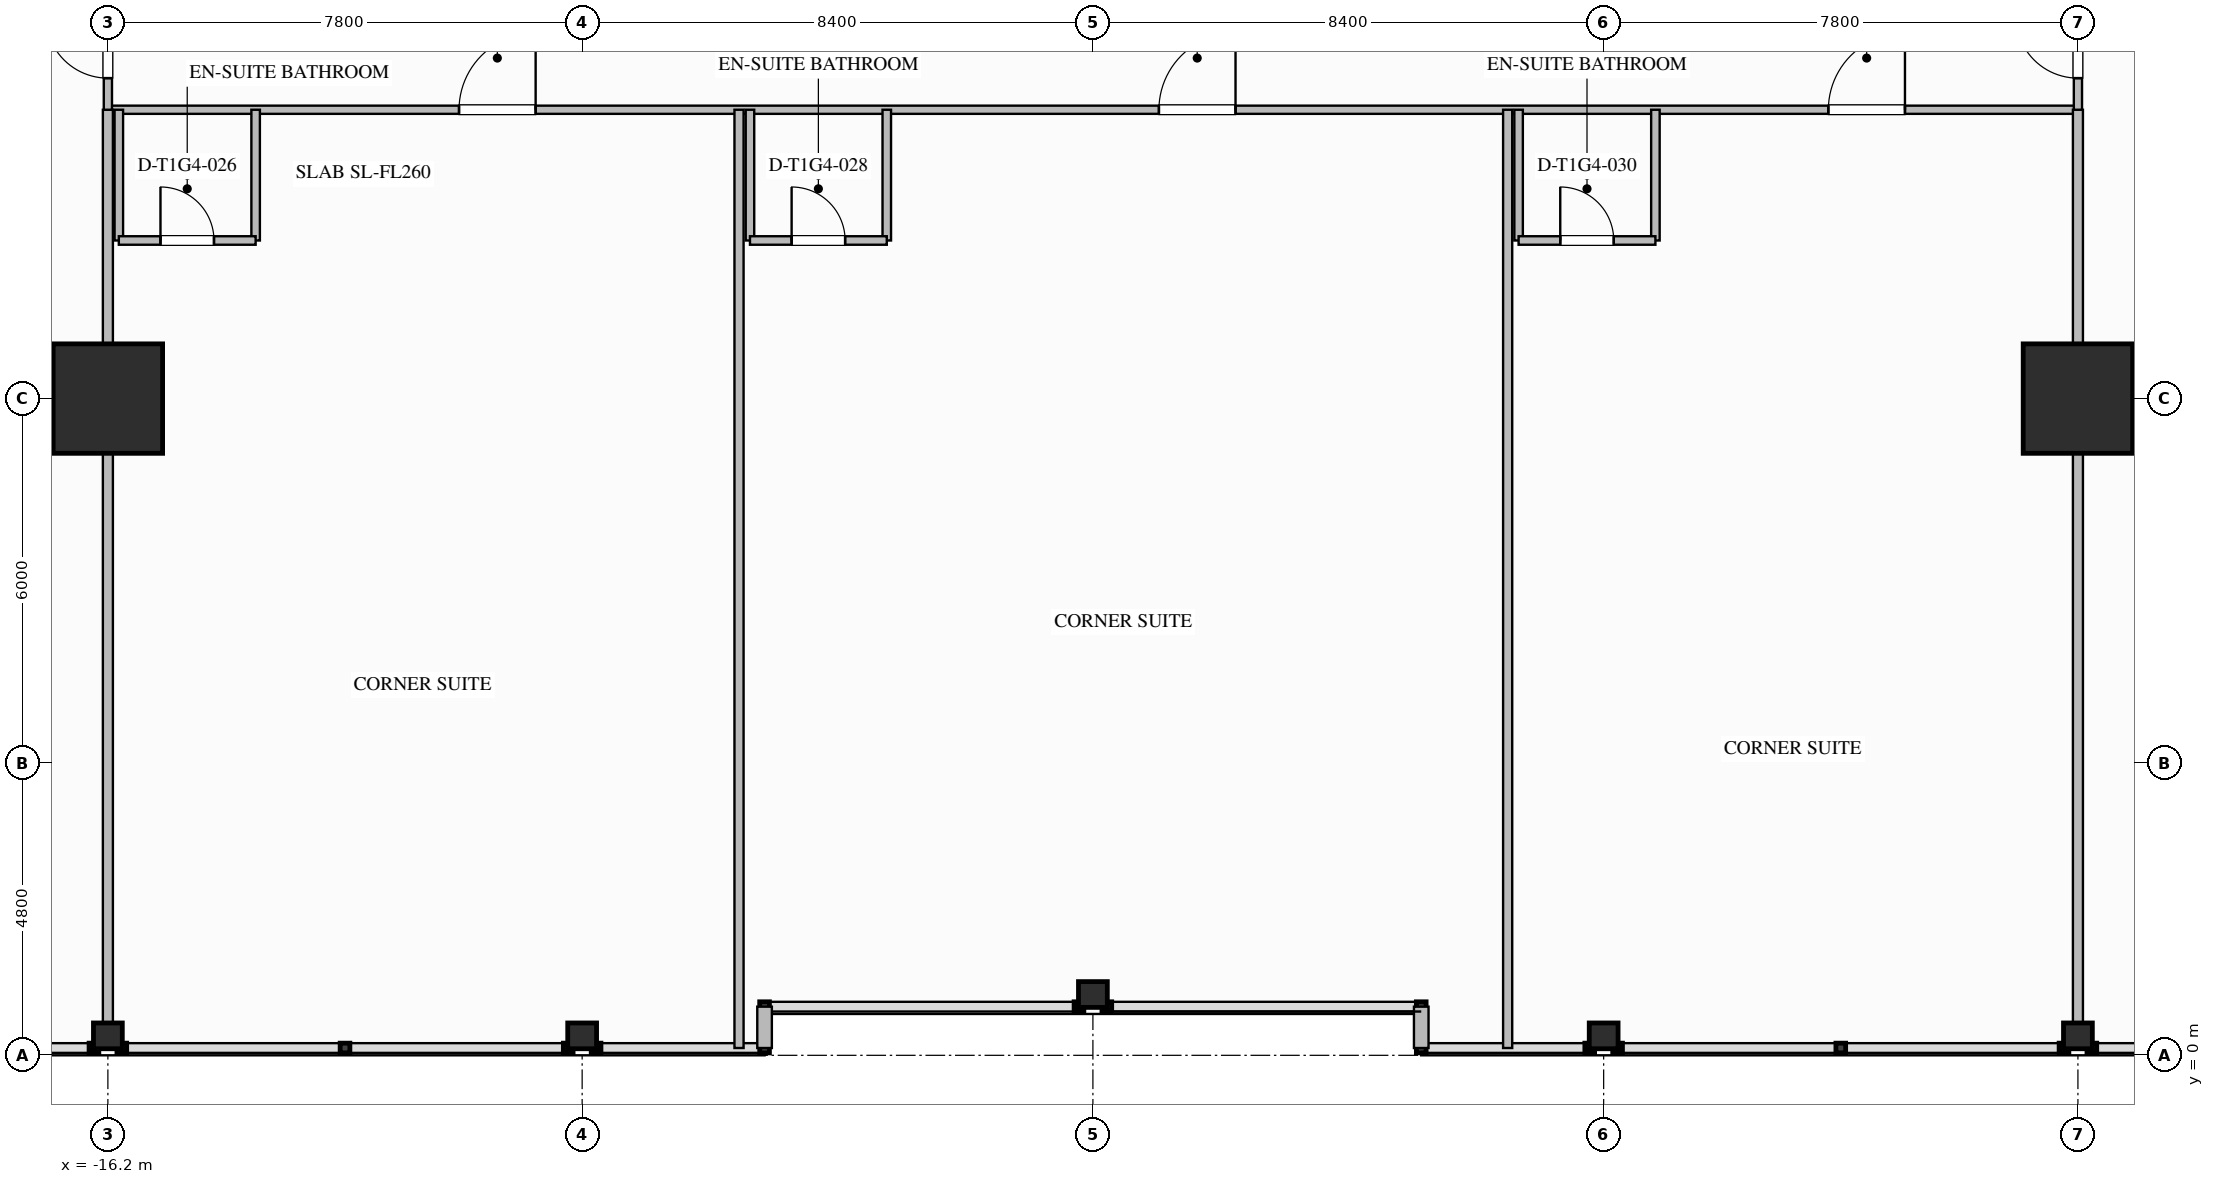
"""IFC4 building model, lengths in metres.
Left out: names, types, materials, properties, quantities, classifications, styles, units other than length and angle.
Written with IfcOpenShell. Run it as: python <this file> out.ifc"""

import sys

from ifc_helpers import new_model, si_unit, direction, frame, frame_2d, origin, origin_2d, place, context, subcontext, project, spatial, rectangle, i_section, extrude, element, fill, save


model = new_model("IFC4")
c1 = context("Model", 3, precision=1e-05, world=origin(), true_north=direction((0.0, 1.0)))
c2 = subcontext(c1, "Body", "Model", "MODEL_VIEW")
j1 = project(units=[si_unit("LENGTHUNIT", "METRE"), si_unit("PLANEANGLEUNIT", "RADIAN")], contexts=[c1])
p1 = place(None, origin())
s1 = spatial("IfcSite", under=j1, at=p1, CompositionType="ELEMENT")
p2 = place(p1, origin())
s2 = spatial("IfcBuilding", under=s1, at=p2, CompositionType="ELEMENT")
p3 = place(p2, frame((0.0, 0.0, 64.7)))
s3 = spatial("IfcBuildingStorey", under=s2, at=p3, CompositionType="ELEMENT", Elevation=64.7)
for number, where, z_axis, x_axis in (
    (1, (-16.2, 10.8, 0.0), (0.0, 0.0, 1.0), (1.0, 0.0, 0.0)),
    (2, (16.2, 10.8, 0.0), (0.0, 0.0, 1.0), (1.0, 0.0, 0.0)),
):
    element("IfcColumn", number, at=place(p3, frame(where, z_axis=z_axis, x_axis=x_axis)), inside=s3, PredefinedType="COLUMN", context=c2, shape_type="SweptSolid", body=[
        extrude(rectangle(XDim=1.8, YDim=1.8, at=origin_2d()), origin(), (0.0, 0.0, 1.0), 3.5),
    ])
for number, where, z_axis, x_axis in (
    (3, (-16.2, 0.32, 0.0), (0.0, 0.0, 1.0), (0.0, 1.0, 0.0)),
    (4, (-8.4, 0.32, 0.0), (0.0, 0.0, 1.0), (0.0, 1.0, 0.0)),
    (5, (0.0, 1.0, 0.0), (0.0, 0.0, 1.0), (0.0, 1.0, 0.0)),
    (6, (8.4, 0.32, 0.0), (0.0, 0.0, 1.0), (0.0, 1.0, 0.0)),
    (7, (16.2, 0.32, 0.0), (0.0, 0.0, 1.0), (0.0, 1.0, 0.0)),
):
    element("IfcColumn", number, at=place(p3, frame(where, z_axis=z_axis, x_axis=x_axis)), inside=s3, PredefinedType="COLUMN", context=c2, shape_type="SweptSolid", body=[
        extrude(i_section(OverallWidth=0.424, OverallDepth=0.474, WebThickness=0.048, FlangeThickness=0.077, FilletRadius=0.03, at=origin_2d()), origin(), (0.0, 0.0, 1.0), 3.497),
    ])
for number, where, z_axis, x_axis in (
    (8, (5.4, 0.12, 0.0), (0.0, 0.0, 1.0), (0.0, 1.0, 0.0)),
    (9, (-5.4, 0.8, 0.0), (0.0, 0.0, 1.0), (0.0, -1.0, 0.0)),
):
    element("IfcWall", number, at=place(p3, frame(where, z_axis=z_axis, x_axis=x_axis)), inside=s3, PredefinedType="STANDARD", context=c2, shape_type="SweptSolid", body=[
        extrude(rectangle(XDim=0.68, YDim=0.24, at=frame_2d((0.34, 0.0))), origin(), (0.0, 0.0, 1.0), 3.24),
    ])
p4 = place(p3, frame((-16.2, 15.55, 0.0), z_axis=(0.0, 0.0, 1.0), x_axis=(1.0, 0.0, 0.0)))
e10 = element("IfcWall", 10, at=p4, inside=s3, PredefinedType="PARTITIONING", context=c2, shape_type="SweptSolid", body=[
    extrude(rectangle(XDim=32.4, YDim=0.135, at=frame_2d((16.2, 0.0))), origin(), (0.0, 0.0, 1.0), 3.24),
])
p5 = place(p4, frame((5.775, 0.0, 0.0)))
e11 = element("IfcOpeningElement", 11, at=p5, cuts=e10, PredefinedType="OPENING", context=c2, shape_type="SweptSolid", body=[
    extrude(rectangle(XDim=1.26, YDim=2.2, at=frame_2d((0.63, 1.1))), frame((0.0, 0.077, 0.0), z_axis=(0.0, -1.0, 0.0), x_axis=(1.0, 0.0, 0.0)), (0.0, 0.0, 1.0), 0.155),
])
p6 = place(p4, frame((17.286, 0.0, 0.0)))
e12 = element("IfcOpeningElement", 12, at=p6, cuts=e10, PredefinedType="OPENING", context=c2, shape_type="SweptSolid", body=[
    extrude(rectangle(XDim=1.26, YDim=2.2, at=frame_2d((0.63, 1.1))), frame((0.0, 0.077, 0.0), z_axis=(0.0, -1.0, 0.0), x_axis=(1.0, 0.0, 0.0)), (0.0, 0.0, 1.0), 0.155),
])
p7 = place(p4, frame((28.295, 0.0, 0.0)))
e13 = element("IfcOpeningElement", 13, at=p7, cuts=e10, PredefinedType="OPENING", context=c2, shape_type="SweptSolid", body=[
    extrude(rectangle(XDim=1.26, YDim=2.2, at=frame_2d((0.63, 1.1))), frame((0.0, 0.077, 0.0), z_axis=(0.0, -1.0, 0.0), x_axis=(1.0, 0.0, 0.0)), (0.0, 0.0, 1.0), 0.155),
])
for number, where, z_axis, x_axis in (
    (14, (-16.2, 0.12, 0.0), (0.0, 0.0, 1.0), (0.0, 1.0, 0.0)),
    (15, (16.2, 0.12, 0.0), (0.0, 0.0, 1.0), (0.0, 1.0, 0.0)),
):
    element("IfcWall", number, at=place(p3, frame(where, z_axis=z_axis, x_axis=x_axis)), inside=s3, PredefinedType="PARTITIONING", context=c2, shape_type="SweptSolid", body=[
        extrude(rectangle(XDim=15.43, YDim=0.165, at=frame_2d((7.715, 0.0))), origin(), (0.0, 0.0, 1.0), 2.452),
    ])
p8 = place(p3, frame((-16.2, 15.55, 0.0), z_axis=(0.0, 0.0, 1.0), x_axis=(0.0, 1.0, 0.0)))
e16 = element("IfcWall", 16, at=p8, inside=s3, PredefinedType="PARTITIONING", context=c2, shape_type="SweptSolid", body=[
    extrude(rectangle(XDim=2.75, YDim=0.135, at=frame_2d((1.375, 0.0))), origin(), (0.0, 0.0, 1.0), 2.452),
])
p9 = place(p8, frame((0.52, 0.0, 0.0)))
e17 = element("IfcOpeningElement", 17, at=p9, cuts=e16, PredefinedType="OPENING", context=c2, shape_type="SweptSolid", body=[
    extrude(rectangle(XDim=1.02, YDim=2.15, at=frame_2d((0.51, 1.075))), frame((0.0, 0.077, 0.0), z_axis=(0.0, -1.0, 0.0), x_axis=(1.0, 0.0, 0.0)), (0.0, 0.0, 1.0), 0.155),
])
p10 = place(p3, frame((16.2, 15.55, 0.0), z_axis=(0.0, 0.0, 1.0), x_axis=(0.0, 1.0, 0.0)))
e18 = element("IfcWall", 18, at=p10, inside=s3, PredefinedType="PARTITIONING", context=c2, shape_type="SweptSolid", body=[
    extrude(rectangle(XDim=2.75, YDim=0.135, at=frame_2d((1.375, 0.0))), origin(), (0.0, 0.0, 1.0), 2.452),
])
p11 = place(p10, frame((0.52, 0.0, 0.0)))
e19 = element("IfcOpeningElement", 19, at=p11, cuts=e18, PredefinedType="OPENING", context=c2, shape_type="SweptSolid", body=[
    extrude(rectangle(XDim=1.02, YDim=2.15, at=frame_2d((0.51, 1.075))), frame((0.0, 0.077, 0.0), z_axis=(0.0, -1.0, 0.0), x_axis=(1.0, 0.0, 0.0)), (0.0, 0.0, 1.0), 0.155),
])
p12 = place(p3, frame((-16.02, 15.55, 0.0), z_axis=(0.0, 0.0, 1.0), x_axis=(0.0, -1.0, 0.0)))
e20 = element("IfcWall", 20, at=p12, inside=s3, PredefinedType="PLUMBINGWALL", context=c2, shape_type="SweptSolid", body=[
    extrude(rectangle(XDim=2.15, YDim=0.14, at=frame_2d((1.075, 0.0))), origin(), (0.0, 0.0, 1.0), 2.452),
])
p13 = place(p3, frame((-13.77, 15.55, 0.0), z_axis=(0.0, 0.0, 1.0), x_axis=(0.0, -1.0, 0.0)))
e21 = element("IfcWall", 21, at=p13, inside=s3, PredefinedType="PLUMBINGWALL", context=c2, shape_type="SweptSolid", body=[
    extrude(rectangle(XDim=2.15, YDim=0.14, at=frame_2d((1.075, 0.0))), origin(), (0.0, 0.0, 1.0), 3.24),
])
p14 = place(p3, frame((-16.02, 13.4, 0.0), z_axis=(0.0, 0.0, 1.0), x_axis=(1.0, 0.0, 0.0)))
e22 = element("IfcWall", 22, at=p14, inside=s3, PredefinedType="PLUMBINGWALL", context=c2, shape_type="SweptSolid", body=[
    extrude(rectangle(XDim=2.25, YDim=0.14, at=frame_2d((1.125, 0.0))), origin(), (0.0, 0.0, 1.0), 3.24),
])
p15 = place(p14, frame((0.685, 0.0, 0.0)))
e23 = element("IfcOpeningElement", 23, at=p15, cuts=e22, PredefinedType="OPENING", context=c2, shape_type="SweptSolid", body=[
    extrude(rectangle(XDim=0.88, YDim=2.1, at=frame_2d((0.44, 1.05))), frame((0.0, 0.08, 0.0), z_axis=(0.0, -1.0, 0.0), x_axis=(1.0, 0.0, 0.0)), (0.0, 0.0, 1.0), 0.16),
])
p16 = place(p3, frame((-5.82, 0.12, 0.0), z_axis=(0.0, 0.0, 1.0), x_axis=(0.0, 1.0, 0.0)))
e24 = element("IfcWall", 24, at=p16, inside=s3, PredefinedType="PARTITIONING", context=c2, shape_type="SweptSolid", body=[
    extrude(rectangle(XDim=15.43, YDim=0.15, at=frame_2d((7.715, 0.0))), origin(), (0.0, 0.0, 1.0), 3.24),
])
for number, where, z_axis, x_axis in (
    (25, (-5.64, 15.55, 0.0), (0.0, 0.0, 1.0), (0.0, -1.0, 0.0)),
    (26, (-3.39, 15.55, 0.0), (0.0, 0.0, 1.0), (0.0, -1.0, 0.0)),
):
    element("IfcWall", number, at=place(p3, frame(where, z_axis=z_axis, x_axis=x_axis)), inside=s3, PredefinedType="PLUMBINGWALL", context=c2, shape_type="SweptSolid", body=[
        extrude(rectangle(XDim=2.15, YDim=0.14, at=frame_2d((1.075, 0.0))), origin(), (0.0, 0.0, 1.0), 3.24),
    ])
p17 = place(p3, frame((-5.64, 13.4, 0.0), z_axis=(0.0, 0.0, 1.0), x_axis=(1.0, 0.0, 0.0)))
e27 = element("IfcWall", 27, at=p17, inside=s3, PredefinedType="PLUMBINGWALL", context=c2, shape_type="SweptSolid", body=[
    extrude(rectangle(XDim=2.25, YDim=0.14, at=frame_2d((1.125, 0.0))), origin(), (0.0, 0.0, 1.0), 3.24),
])
p18 = place(p17, frame((0.685, 0.0, 0.0)))
e28 = element("IfcOpeningElement", 28, at=p18, cuts=e27, PredefinedType="OPENING", context=c2, shape_type="SweptSolid", body=[
    extrude(rectangle(XDim=0.88, YDim=2.1, at=frame_2d((0.44, 1.05))), frame((0.0, 0.08, 0.0), z_axis=(0.0, -1.0, 0.0), x_axis=(1.0, 0.0, 0.0)), (0.0, 0.0, 1.0), 0.16),
])
p19 = place(p3, frame((6.821, 0.12, 0.0), z_axis=(0.0, 0.0, 1.0), x_axis=(0.0, 1.0, 0.0)))
e29 = element("IfcWall", 29, at=p19, inside=s3, PredefinedType="PARTITIONING", context=c2, shape_type="SweptSolid", body=[
    extrude(rectangle(XDim=15.43, YDim=0.15, at=frame_2d((7.715, 0.0))), origin(), (0.0, 0.0, 1.0), 3.24),
])
for number, where, z_axis, x_axis in (
    (30, (7.001, 15.55, 0.0), (0.0, 0.0, 1.0), (0.0, -1.0, 0.0)),
    (31, (9.251, 15.55, 0.0), (0.0, 0.0, 1.0), (0.0, -1.0, 0.0)),
):
    element("IfcWall", number, at=place(p3, frame(where, z_axis=z_axis, x_axis=x_axis)), inside=s3, PredefinedType="PLUMBINGWALL", context=c2, shape_type="SweptSolid", body=[
        extrude(rectangle(XDim=2.15, YDim=0.14, at=frame_2d((1.075, 0.0))), origin(), (0.0, 0.0, 1.0), 3.24),
    ])
p20 = place(p3, frame((7.001, 13.4, 0.0), z_axis=(0.0, 0.0, 1.0), x_axis=(1.0, 0.0, 0.0)))
e32 = element("IfcWall", 32, at=p20, inside=s3, PredefinedType="PLUMBINGWALL", context=c2, shape_type="SweptSolid", body=[
    extrude(rectangle(XDim=2.25, YDim=0.14, at=frame_2d((1.125, 0.0))), origin(), (0.0, 0.0, 1.0), 3.24),
])
p21 = place(p20, frame((0.685, 0.0, 0.0)))
e33 = element("IfcOpeningElement", 33, at=p21, cuts=e32, PredefinedType="OPENING", context=c2, shape_type="SweptSolid", body=[
    extrude(rectangle(XDim=0.88, YDim=2.1, at=frame_2d((0.44, 1.05))), frame((0.0, 0.08, 0.0), z_axis=(0.0, -1.0, 0.0), x_axis=(1.0, 0.0, 0.0)), (0.0, 0.0, 1.0), 0.16),
])
p22 = place(p9, origin())
e34 = element("IfcDoor", 34, at=p22, inside=s3, OperationType="SINGLE_SWING_RIGHT", PredefinedType="DOOR", context=c2, shape_type="SweptSolid", body=[
    extrude(rectangle(XDim=1.02, YDim=2.15, at=frame_2d((0.51, 1.075))), frame((0.0, 0.025, 0.0), z_axis=(0.0, -1.0, 0.0), x_axis=(1.0, 0.0, 0.0)), (0.0, 0.0, 1.0), 0.05),
])
fill(e17, e34)
p23 = place(p11, origin())
e35 = element("IfcDoor", 35, at=p23, inside=s3, OperationType="SINGLE_SWING_RIGHT", PredefinedType="DOOR", context=c2, shape_type="SweptSolid", body=[
    extrude(rectangle(XDim=1.02, YDim=2.15, at=frame_2d((0.51, 1.075))), frame((0.0, 0.025, 0.0), z_axis=(0.0, -1.0, 0.0), x_axis=(1.0, 0.0, 0.0)), (0.0, 0.0, 1.0), 0.05),
])
fill(e19, e35)
p24 = place(p15, origin())
e36 = element("IfcDoor", 36, at=p24, inside=s3, OperationType="SINGLE_SWING_LEFT", PredefinedType="DOOR", context=c2, shape_type="SweptSolid", body=[
    extrude(rectangle(XDim=0.88, YDim=2.1, at=frame_2d((0.44, 1.05))), frame((0.0, 0.025, 0.0), z_axis=(0.0, -1.0, 0.0), x_axis=(1.0, 0.0, 0.0)), (0.0, 0.0, 1.0), 0.05),
])
fill(e23, e36)
p25 = place(p5, origin())
e37 = element("IfcDoor", 37, at=p25, inside=s3, OperationType="SINGLE_SWING_RIGHT", PredefinedType="DOOR", context=c2, shape_type="SweptSolid", body=[
    extrude(rectangle(XDim=1.26, YDim=2.2, at=frame_2d((0.63, 1.1))), frame((0.0, 0.025, 0.0), z_axis=(0.0, -1.0, 0.0), x_axis=(1.0, 0.0, 0.0)), (0.0, 0.0, 1.0), 0.05),
])
fill(e11, e37)
p26 = place(p18, origin())
e38 = element("IfcDoor", 38, at=p26, inside=s3, OperationType="SINGLE_SWING_LEFT", PredefinedType="DOOR", context=c2, shape_type="SweptSolid", body=[
    extrude(rectangle(XDim=0.88, YDim=2.1, at=frame_2d((0.44, 1.05))), frame((0.0, 0.025, 0.0), z_axis=(0.0, -1.0, 0.0), x_axis=(1.0, 0.0, 0.0)), (0.0, 0.0, 1.0), 0.05),
])
fill(e28, e38)
p27 = place(p6, origin())
e39 = element("IfcDoor", 39, at=p27, inside=s3, OperationType="SINGLE_SWING_RIGHT", PredefinedType="DOOR", context=c2, shape_type="SweptSolid", body=[
    extrude(rectangle(XDim=1.26, YDim=2.2, at=frame_2d((0.63, 1.1))), frame((0.0, 0.025, 0.0), z_axis=(0.0, -1.0, 0.0), x_axis=(1.0, 0.0, 0.0)), (0.0, 0.0, 1.0), 0.05),
])
fill(e12, e39)
p28 = place(p21, origin())
e40 = element("IfcDoor", 40, at=p28, inside=s3, OperationType="SINGLE_SWING_LEFT", PredefinedType="DOOR", context=c2, shape_type="SweptSolid", body=[
    extrude(rectangle(XDim=0.88, YDim=2.1, at=frame_2d((0.44, 1.05))), frame((0.0, 0.025, 0.0), z_axis=(0.0, -1.0, 0.0), x_axis=(1.0, 0.0, 0.0)), (0.0, 0.0, 1.0), 0.05),
])
fill(e33, e40)
p29 = place(p7, origin())
e41 = element("IfcDoor", 41, at=p29, inside=s3, OperationType="SINGLE_SWING_RIGHT", PredefinedType="DOOR", context=c2, shape_type="SweptSolid", body=[
    extrude(rectangle(XDim=1.26, YDim=2.2, at=frame_2d((0.63, 1.1))), frame((0.0, 0.025, 0.0), z_axis=(0.0, -1.0, 0.0), x_axis=(1.0, 0.0, 0.0)), (0.0, 0.0, 1.0), 0.05),
])
fill(e13, e41)
save(model, sys.argv[1])
